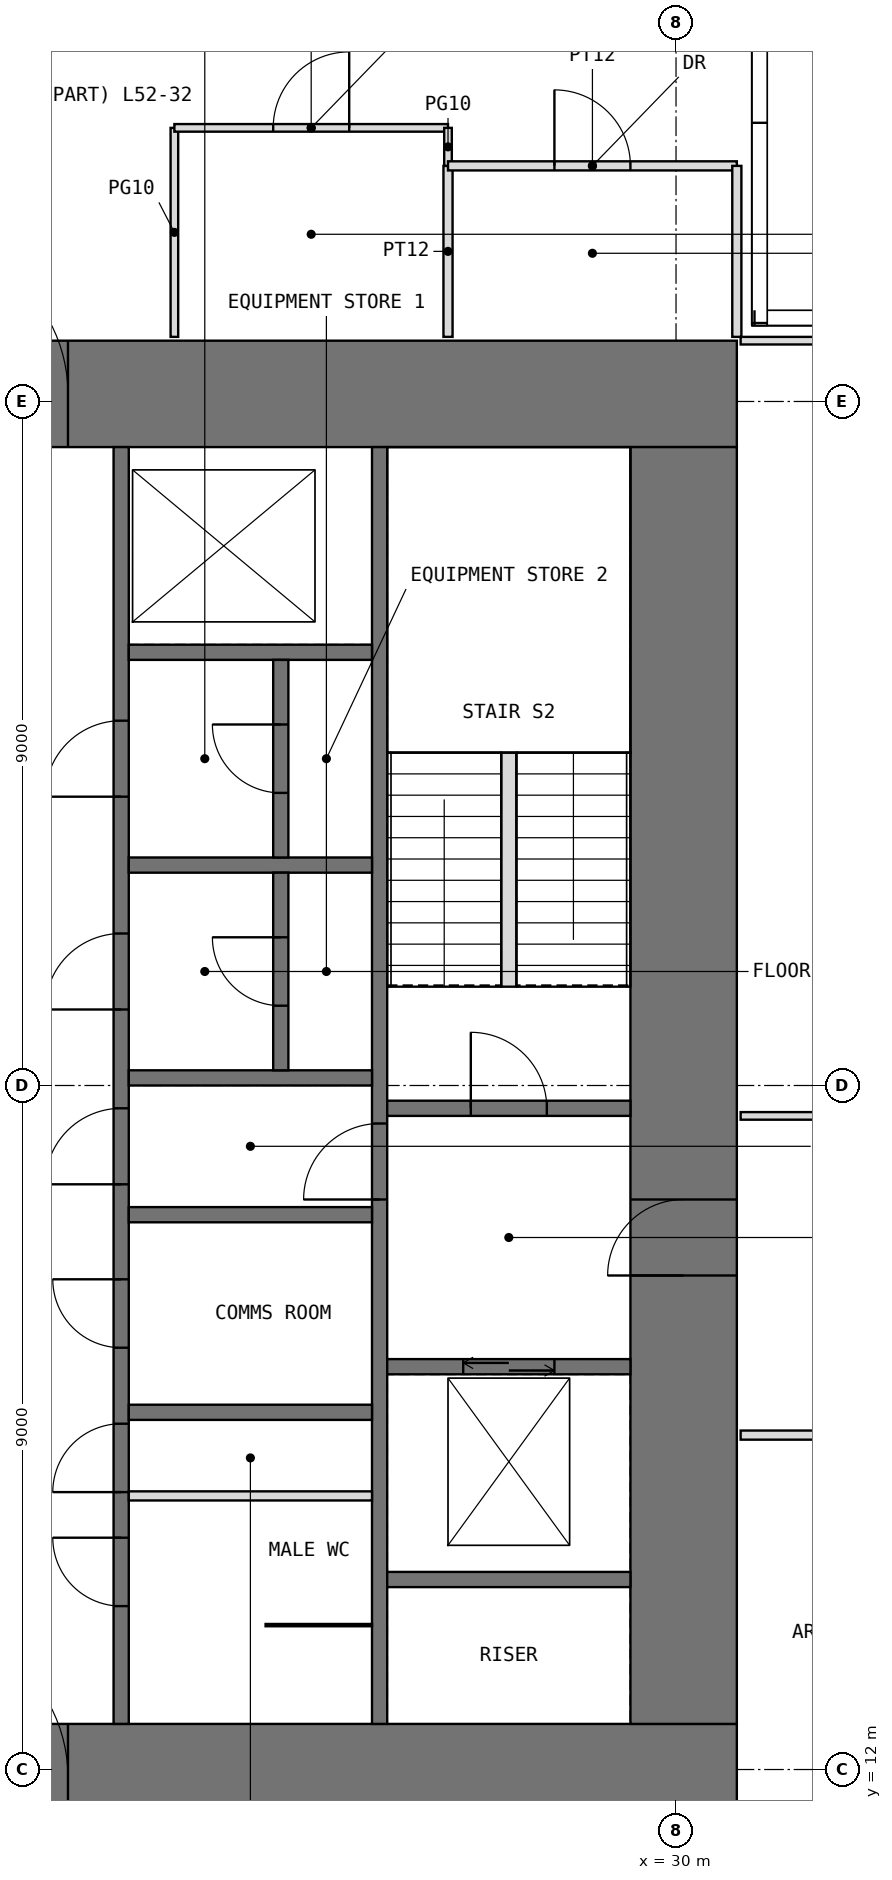
"""IFC4 building model, lengths in metres.
Left out: names, types, materials, properties, quantities, classifications, styles, units other than length and angle.
Written with IfcOpenShell. Run it as: python <this file> out.ifc"""

import sys

from ifc_helpers import new_model, si_unit, direction, frame, frame_2d, origin, place, context, subcontext, project, spatial, rectangle, extrude, element, fill, save


model = new_model("IFC4")
c1 = context("Model", 3, precision=1e-05, world=origin(), true_north=direction((0.0, 1.0)))
c2 = subcontext(c1, "Body", "Model", "MODEL_VIEW")
j1 = project(units=[si_unit("LENGTHUNIT", "METRE"), si_unit("PLANEANGLEUNIT", "RADIAN")], contexts=[c1])
p1 = place(None, origin())
s1 = spatial("IfcSite", under=j1, at=p1, CompositionType="ELEMENT")
p2 = place(p1, origin())
s2 = spatial("IfcBuilding", under=s1, at=p2, CompositionType="ELEMENT")
p3 = place(p2, frame((0.0, 0.0, 218.5)))
s3 = spatial("IfcBuildingStorey", under=s2, at=p3, CompositionType="ELEMENT", Elevation=218.5)
p4 = place(p3, frame((11.2, 11.9, -0.05), z_axis=(0.0, 0.0, 1.0), x_axis=(1.0, 0.0, 0.0)))
e1 = element("IfcWall", 1, at=p4, inside=s3, PredefinedType="SHEAR", context=c2, shape_type="SweptSolid", body=[
    extrude(rectangle(XDim=19.6, YDim=1.4, at=frame_2d((9.8, 0.0))), origin(), (0.0, 0.0, 1.0), 4.0),
])
p5 = place(p4, frame((8.8, 0.0, 0.05)))
e2 = element("IfcOpeningElement", 2, at=p5, cuts=e1, PredefinedType="OPENING", context=c2, shape_type="SweptSolid", body=[
    extrude(rectangle(XDim=2.0, YDim=2.2, at=frame_2d((1.0, 1.1))), frame((0.0, 0.71, 0.0), z_axis=(0.0, -1.0, 0.0), x_axis=(1.0, 0.0, 0.0)), (0.0, 0.0, 1.0), 1.42),
])
p6 = place(p3, frame((11.2, 30.1, -0.05), z_axis=(0.0, 0.0, 1.0), x_axis=(1.0, 0.0, 0.0)))
e3 = element("IfcWall", 3, at=p6, inside=s3, PredefinedType="SHEAR", context=c2, shape_type="SweptSolid", body=[
    extrude(rectangle(XDim=19.6, YDim=1.4, at=frame_2d((9.8, 0.0))), origin(), (0.0, 0.0, 1.0), 4.0),
])
p7 = place(p6, frame((8.8, 0.0, 0.05)))
e4 = element("IfcOpeningElement", 4, at=p7, cuts=e3, PredefinedType="OPENING", context=c2, shape_type="SweptSolid", body=[
    extrude(rectangle(XDim=2.0, YDim=2.2, at=frame_2d((1.0, 1.1))), frame((0.0, 0.71, 0.0), z_axis=(0.0, -1.0, 0.0), x_axis=(1.0, 0.0, 0.0)), (0.0, 0.0, 1.0), 1.42),
])
p8 = place(p3, frame((30.1, 12.6, -0.05), z_axis=(0.0, 0.0, 1.0), x_axis=(0.0, 1.0, 0.0)))
e5 = element("IfcWall", 5, at=p8, inside=s3, PredefinedType="SHEAR", context=c2, shape_type="SweptSolid", body=[
    extrude(rectangle(XDim=16.8, YDim=1.4, at=frame_2d((8.4, 0.0))), origin(), (0.0, 0.0, 1.0), 4.0),
])
p9 = place(p8, frame((5.9, 0.0, 0.05)))
e6 = element("IfcOpeningElement", 6, at=p9, cuts=e5, PredefinedType="OPENING", context=c2, shape_type="SweptSolid", body=[
    extrude(rectangle(XDim=1.0, YDim=2.2, at=frame_2d((0.5, 1.1))), frame((0.0, 0.71, 0.0), z_axis=(0.0, -1.0, 0.0), x_axis=(1.0, 0.0, 0.0)), (0.0, 0.0, 1.0), 1.42),
])
p10 = place(p3, frame((22.7, 12.6, -0.05), z_axis=(0.0, 0.0, 1.0), x_axis=(0.0, 1.0, 0.0)))
e7 = element("IfcWall", 7, at=p10, inside=s3, PredefinedType="SHEAR", context=c2, shape_type="SweptSolid", body=[
    extrude(rectangle(XDim=16.8, YDim=0.2, at=frame_2d((8.4, 0.0))), origin(), (0.0, 0.0, 1.0), 4.0),
])
p11 = place(p10, frame((3.05, 0.0, 0.05)))
e8 = element("IfcOpeningElement", 8, at=p11, cuts=e7, PredefinedType="OPENING", context=c2, shape_type="SweptSolid", body=[
    extrude(rectangle(XDim=0.9, YDim=2.2, at=frame_2d((0.45, 1.1))), frame((0.0, 0.11, 0.0), z_axis=(0.0, -1.0, 0.0), x_axis=(1.0, 0.0, 0.0)), (0.0, 0.0, 1.0), 0.22),
])
p12 = place(p10, frame((7.1, 0.0, 0.05)))
e9 = element("IfcOpeningElement", 9, at=p12, cuts=e7, PredefinedType="OPENING", context=c2, shape_type="SweptSolid", body=[
    extrude(rectangle(XDim=1.0, YDim=2.2, at=frame_2d((0.5, 1.1))), frame((0.0, 0.11, 0.0), z_axis=(0.0, -1.0, 0.0), x_axis=(1.0, 0.0, 0.0)), (0.0, 0.0, 1.0), 0.22),
])
p13 = place(p10, frame((1.55, 0.0, 0.05)))
e10 = element("IfcOpeningElement", 10, at=p13, cuts=e7, PredefinedType="OPENING", context=c2, shape_type="SweptSolid", body=[
    extrude(rectangle(XDim=0.9, YDim=2.2, at=frame_2d((0.45, 1.1))), frame((0.0, 0.11, 0.0), z_axis=(0.0, -1.0, 0.0), x_axis=(1.0, 0.0, 0.0)), (0.0, 0.0, 1.0), 0.22),
])
p14 = place(p10, frame((4.95, 0.0, 0.05)))
e11 = element("IfcOpeningElement", 11, at=p14, cuts=e7, PredefinedType="OPENING", context=c2, shape_type="SweptSolid", body=[
    extrude(rectangle(XDim=0.9, YDim=2.2, at=frame_2d((0.45, 1.1))), frame((0.0, 0.11, 0.0), z_axis=(0.0, -1.0, 0.0), x_axis=(1.0, 0.0, 0.0)), (0.0, 0.0, 1.0), 0.22),
])
p15 = place(p10, frame((9.4, 0.0, 0.05)))
e12 = element("IfcOpeningElement", 12, at=p15, cuts=e7, PredefinedType="OPENING", context=c2, shape_type="SweptSolid", body=[
    extrude(rectangle(XDim=1.0, YDim=2.2, at=frame_2d((0.5, 1.1))), frame((0.0, 0.11, 0.0), z_axis=(0.0, -1.0, 0.0), x_axis=(1.0, 0.0, 0.0)), (0.0, 0.0, 1.0), 0.22),
])
p16 = place(p10, frame((12.2, 0.0, 0.05)))
e13 = element("IfcOpeningElement", 13, at=p16, cuts=e7, PredefinedType="OPENING", context=c2, shape_type="SweptSolid", body=[
    extrude(rectangle(XDim=1.0, YDim=2.2, at=frame_2d((0.5, 1.1))), frame((0.0, 0.11, 0.0), z_axis=(0.0, -1.0, 0.0), x_axis=(1.0, 0.0, 0.0)), (0.0, 0.0, 1.0), 0.22),
])
p17 = place(p3, frame((26.1, 12.6, -0.05), z_axis=(0.0, 0.0, 1.0), x_axis=(0.0, 1.0, 0.0)))
e14 = element("IfcWall", 14, at=p17, inside=s3, PredefinedType="SHEAR", context=c2, shape_type="SweptSolid", body=[
    extrude(rectangle(XDim=16.8, YDim=0.2, at=frame_2d((8.4, 0.0))), origin(), (0.0, 0.0, 1.0), 4.0),
])
p18 = place(p17, frame((6.9, 0.0, 0.05)))
e15 = element("IfcOpeningElement", 15, at=p18, cuts=e14, PredefinedType="OPENING", context=c2, shape_type="SweptSolid", body=[
    extrude(rectangle(XDim=1.0, YDim=2.2, at=frame_2d((0.5, 1.1))), frame((0.0, 0.11, 0.0), z_axis=(0.0, -1.0, 0.0), x_axis=(1.0, 0.0, 0.0)), (0.0, 0.0, 1.0), 0.22),
])
for number, where, z_axis, x_axis in (
    (16, (22.8, 16.7, -0.05), (0.0, 0.0, 1.0), (1.0, 0.0, 0.0)),
    (17, (22.8, 19.3, -0.05), (0.0, 0.0, 1.0), (1.0, 0.0, 0.0)),
    (18, (22.8, 21.1, -0.05), (0.0, 0.0, 1.0), (1.0, 0.0, 0.0)),
    (19, (22.8, 23.9, -0.05), (0.0, 0.0, 1.0), (1.0, 0.0, 0.0)),
    (20, (22.8, 26.7, -0.05), (0.0, 0.0, 1.0), (1.0, 0.0, 0.0)),
    (21, (26.2, 14.5, -0.05), (0.0, 0.0, 1.0), (1.0, 0.0, 0.0)),
):
    element("IfcWall", number, at=place(p3, frame(where, z_axis=z_axis, x_axis=x_axis)), inside=s3, PredefinedType="SHEAR", context=c2, shape_type="SweptSolid", body=[
        extrude(rectangle(XDim=3.2, YDim=0.2, at=frame_2d((1.6, 0.0))), origin(), (0.0, 0.0, 1.0), 4.0),
    ])
p19 = place(p3, frame((26.2, 17.3, -0.05), z_axis=(0.0, 0.0, 1.0), x_axis=(1.0, 0.0, 0.0)))
e22 = element("IfcWall", 22, at=p19, inside=s3, PredefinedType="SHEAR", context=c2, shape_type="SweptSolid", body=[
    extrude(rectangle(XDim=3.2, YDim=0.2, at=frame_2d((1.6, 0.0))), origin(), (0.0, 0.0, 1.0), 4.0),
])
p20 = place(p19, frame((1.0, 0.0, 0.05)))
e23 = element("IfcOpeningElement", 23, at=p20, cuts=e22, PredefinedType="OPENING", context=c2, shape_type="SweptSolid", body=[
    extrude(rectangle(XDim=1.2, YDim=2.2, at=frame_2d((0.6, 1.1))), frame((0.0, 0.11, 0.0), z_axis=(0.0, -1.0, 0.0), x_axis=(1.0, 0.0, 0.0)), (0.0, 0.0, 1.0), 0.22),
])
p21 = place(p3, frame((26.2, 20.7, -0.05), z_axis=(0.0, 0.0, 1.0), x_axis=(1.0, 0.0, 0.0)))
e24 = element("IfcWall", 24, at=p21, inside=s3, PredefinedType="SHEAR", context=c2, shape_type="SweptSolid", body=[
    extrude(rectangle(XDim=3.2, YDim=0.2, at=frame_2d((1.6, 0.0))), origin(), (0.0, 0.0, 1.0), 4.0),
])
p22 = place(p21, frame((1.1, 0.0, 0.05)))
e25 = element("IfcOpeningElement", 25, at=p22, cuts=e24, PredefinedType="OPENING", context=c2, shape_type="SweptSolid", body=[
    extrude(rectangle(XDim=1.0, YDim=2.2, at=frame_2d((0.5, 1.1))), frame((0.0, 0.11, 0.0), z_axis=(0.0, -1.0, 0.0), x_axis=(1.0, 0.0, 0.0)), (0.0, 0.0, 1.0), 0.22),
])
p23 = place(p3, frame((22.8, 15.6, 0.0), z_axis=(0.0, 0.0, 1.0), x_axis=(1.0, 0.0, 0.0)))
e26 = element("IfcWall", 26, at=p23, inside=s3, PredefinedType="PARTITIONING", context=c2, shape_type="SweptSolid", body=[
    extrude(rectangle(XDim=3.2, YDim=0.12, at=frame_2d((1.6, 0.0))), origin(), (0.0, 0.0, 1.0), 3.75),
])
p24 = place(p3, frame((24.6, 13.9, 0.0), z_axis=(0.0, 0.0, 1.0), x_axis=(1.0, 0.0, 0.0)))
e27 = element("IfcWall", 27, at=p24, inside=s3, PredefinedType="PARTITIONING", context=c2, shape_type="SweptSolid", body=[
    extrude(rectangle(XDim=1.4, YDim=0.03, at=frame_2d((0.7, 0.0))), origin(), (0.0, 0.0, 1.0), 3.75),
])
p25 = place(p3, frame((24.8, 21.2, -0.05), z_axis=(0.0, 0.0, 1.0), x_axis=(0.0, 1.0, 0.0)))
e28 = element("IfcWall", 28, at=p25, inside=s3, PredefinedType="SHEAR", context=c2, shape_type="SweptSolid", body=[
    extrude(rectangle(XDim=2.6, YDim=0.2, at=frame_2d((1.3, 0.0))), origin(), (0.0, 0.0, 1.0), 4.0),
])
p26 = place(p25, frame((0.85, 0.0, 0.05)))
e29 = element("IfcOpeningElement", 29, at=p26, cuts=e28, PredefinedType="OPENING", context=c2, shape_type="SweptSolid", body=[
    extrude(rectangle(XDim=0.9, YDim=2.2, at=frame_2d((0.45, 1.1))), frame((0.0, 0.11, 0.0), z_axis=(0.0, -1.0, 0.0), x_axis=(1.0, 0.0, 0.0)), (0.0, 0.0, 1.0), 0.22),
])
p27 = place(p3, frame((24.8, 24.0, -0.05), z_axis=(0.0, 0.0, 1.0), x_axis=(0.0, 1.0, 0.0)))
e30 = element("IfcWall", 30, at=p27, inside=s3, PredefinedType="SHEAR", context=c2, shape_type="SweptSolid", body=[
    extrude(rectangle(XDim=2.6, YDim=0.2, at=frame_2d((1.3, 0.0))), origin(), (0.0, 0.0, 1.0), 4.0),
])
p28 = place(p27, frame((0.85, 0.0, 0.05)))
e31 = element("IfcOpeningElement", 31, at=p28, cuts=e30, PredefinedType="OPENING", context=c2, shape_type="SweptSolid", body=[
    extrude(rectangle(XDim=0.9, YDim=2.2, at=frame_2d((0.45, 1.1))), frame((0.0, 0.11, 0.0), z_axis=(0.0, -1.0, 0.0), x_axis=(1.0, 0.0, 0.0)), (0.0, 0.0, 1.0), 0.22),
])
p29 = place(p3, frame((23.4, 30.85, 0.0), z_axis=(0.0, 0.0, 1.0), x_axis=(0.0, 1.0, 0.0)))
e32 = element("IfcWall", 32, at=p29, inside=s3, PredefinedType="PARTITIONING", context=c2, shape_type="SweptSolid", body=[
    extrude(rectangle(XDim=2.75, YDim=0.1, at=frame_2d((1.375, 0.0))), origin(), (0.0, 0.0, 1.0), 3.75),
])
p30 = place(p3, frame((23.4, 33.6, 0.0), z_axis=(0.0, 0.0, 1.0), x_axis=(1.0, 0.0, 0.0)))
e33 = element("IfcWall", 33, at=p30, inside=s3, PredefinedType="PARTITIONING", context=c2, shape_type="SweptSolid", body=[
    extrude(rectangle(XDim=3.6, YDim=0.1, at=frame_2d((1.8, 0.0))), origin(), (0.0, 0.0, 1.0), 3.75),
])
p31 = place(p30, frame((1.3, 0.0, 0.0)))
e34 = element("IfcOpeningElement", 34, at=p31, cuts=e33, PredefinedType="OPENING", context=c2, shape_type="SweptSolid", body=[
    extrude(rectangle(XDim=1.0, YDim=2.4, at=frame_2d((0.5, 1.2))), frame((0.0, 0.06, 0.0), z_axis=(0.0, -1.0, 0.0), x_axis=(1.0, 0.0, 0.0)), (0.0, 0.0, 1.0), 0.12),
])
p32 = place(p3, frame((27.0, 30.85, 0.0), z_axis=(0.0, 0.0, 1.0), x_axis=(0.0, 1.0, 0.0)))
e35 = element("IfcWall", 35, at=p32, inside=s3, PredefinedType="PARTITIONING", context=c2, shape_type="SweptSolid", body=[
    extrude(rectangle(XDim=2.25, YDim=0.12, at=frame_2d((1.125, 0.0))), origin(), (0.0, 0.0, 1.0), 3.75),
])
p33 = place(p3, frame((27.0, 33.1, 0.0), z_axis=(0.0, 0.0, 1.0), x_axis=(0.0, 1.0, 0.0)))
e36 = element("IfcWall", 36, at=p33, inside=s3, PredefinedType="PARTITIONING", context=c2, shape_type="SweptSolid", body=[
    extrude(rectangle(XDim=0.5, YDim=0.1, at=frame_2d((0.25, 0.0))), origin(), (0.0, 0.0, 1.0), 3.75),
])
p34 = place(p3, frame((27.0, 33.1, 0.0), z_axis=(0.0, 0.0, 1.0), x_axis=(1.0, 0.0, 0.0)))
e37 = element("IfcWall", 37, at=p34, inside=s3, PredefinedType="PARTITIONING", context=c2, shape_type="SweptSolid", body=[
    extrude(rectangle(XDim=3.8, YDim=0.12, at=frame_2d((1.9, 0.0))), origin(), (0.0, 0.0, 1.0), 3.75),
])
p35 = place(p34, frame((1.4, 0.0, 0.0)))
e38 = element("IfcOpeningElement", 38, at=p35, cuts=e37, PredefinedType="OPENING", context=c2, shape_type="SweptSolid", body=[
    extrude(rectangle(XDim=1.0, YDim=2.2, at=frame_2d((0.5, 1.1))), frame((0.0, 0.07, 0.0), z_axis=(0.0, -1.0, 0.0), x_axis=(1.0, 0.0, 0.0)), (0.0, 0.0, 1.0), 0.14),
])
p36 = place(p3, frame((30.8, 30.85, 0.0), z_axis=(0.0, 0.0, 1.0), x_axis=(0.0, 1.0, 0.0)))
e39 = element("IfcWall", 39, at=p36, inside=s3, PredefinedType="PARTITIONING", context=c2, shape_type="SweptSolid", body=[
    extrude(rectangle(XDim=2.25, YDim=0.12, at=frame_2d((1.125, 0.0))), origin(), (0.0, 0.0, 1.0), 3.75),
])
p37 = place(p3, frame((30.85, 16.4, 0.0), z_axis=(0.0, 0.0, 1.0), x_axis=(1.0, 0.0, 0.0)))
e40 = element("IfcWall", 40, at=p37, inside=s3, PredefinedType="PARTITIONING", context=c2, shape_type="SweptSolid", body=[
    extrude(rectangle(XDim=4.45, YDim=0.12, at=frame_2d((2.225, 0.0))), origin(), (0.0, 0.0, 1.0), 3.75),
])
for number, where, z_axis, x_axis in (
    (41, (30.85, 20.6, 0.0), (0.0, 0.0, 1.0), (1.0, 0.0, 0.0)),
    (42, (30.85, 30.8, 0.0), (0.0, 0.0, 1.0), (1.0, 0.0, 0.0)),
):
    element("IfcWall", number, at=place(p3, frame(where, z_axis=z_axis, x_axis=x_axis)), inside=s3, PredefinedType="PARTITIONING", context=c2, shape_type="SweptSolid", body=[
        extrude(rectangle(XDim=4.95, YDim=0.1, at=frame_2d((2.475, 0.0))), origin(), (0.0, 0.0, 1.0), 3.75),
    ])
p38 = place(p3, frame((27.8, 22.3, 0.0), z_axis=(0.0, 0.0, 1.0), x_axis=(0.0, 1.0, 0.0)))
e43 = element("IfcWall", 43, at=p38, inside=s3, PredefinedType="PARTITIONING", context=c2, shape_type="SweptSolid", body=[
    extrude(rectangle(XDim=3.08, YDim=0.2, at=frame_2d((1.54, 0.0))), origin(), (0.0, 0.0, 1.0), 4.0),
])
p39 = place(p5, origin())
e44 = element("IfcDoor", 44, at=p39, inside=s3, OperationType="DOUBLE_DOOR_SINGLE_SWING", PredefinedType="DOOR", context=c2, shape_type="SweptSolid", body=[
    extrude(rectangle(XDim=2.0, YDim=2.2, at=frame_2d((1.0, 1.1))), frame((0.0, 0.025, 0.0), z_axis=(0.0, -1.0, 0.0), x_axis=(1.0, 0.0, 0.0)), (0.0, 0.0, 1.0), 0.05),
])
fill(e2, e44)
p40 = place(p7, origin())
e45 = element("IfcDoor", 45, at=p40, inside=s3, OperationType="DOUBLE_DOOR_SINGLE_SWING", PredefinedType="DOOR", context=c2, shape_type="SweptSolid", body=[
    extrude(rectangle(XDim=2.0, YDim=2.2, at=frame_2d((1.0, 1.1))), frame((0.0, 0.025, 0.0), z_axis=(0.0, -1.0, 0.0), x_axis=(1.0, 0.0, 0.0)), (0.0, 0.0, 1.0), 0.05),
])
fill(e4, e45)
p41 = place(p11, origin())
e46 = element("IfcDoor", 46, at=p41, inside=s3, OperationType="SINGLE_SWING_LEFT", PredefinedType="DOOR", context=c2, shape_type="SweptSolid", body=[
    extrude(rectangle(XDim=0.9, YDim=2.2, at=frame_2d((0.45, 1.1))), frame((0.0, 0.025, 0.0), z_axis=(0.0, -1.0, 0.0), x_axis=(1.0, 0.0, 0.0)), (0.0, 0.0, 1.0), 0.05),
])
fill(e8, e46)
p42 = place(p9, origin())
e47 = element("IfcDoor", 47, at=p42, inside=s3, OperationType="SINGLE_SWING_LEFT", PredefinedType="DOOR", context=c2, shape_type="SweptSolid", body=[
    extrude(rectangle(XDim=1.0, YDim=2.2, at=frame_2d((0.5, 1.1))), frame((0.0, 0.025, 0.0), z_axis=(0.0, -1.0, 0.0), x_axis=(1.0, 0.0, 0.0)), (0.0, 0.0, 1.0), 0.05),
])
fill(e6, e47)
p43 = place(p22, origin())
e48 = element("IfcDoor", 48, at=p43, inside=s3, OperationType="SINGLE_SWING_LEFT", PredefinedType="DOOR", context=c2, shape_type="SweptSolid", body=[
    extrude(rectangle(XDim=1.0, YDim=2.2, at=frame_2d((0.5, 1.1))), frame((0.0, 0.025, 0.0), z_axis=(0.0, -1.0, 0.0), x_axis=(1.0, 0.0, 0.0)), (0.0, 0.0, 1.0), 0.05),
])
fill(e25, e48)
p44 = place(p18, origin())
e49 = element("IfcDoor", 49, at=p44, inside=s3, OperationType="SINGLE_SWING_LEFT", PredefinedType="DOOR", context=c2, shape_type="SweptSolid", body=[
    extrude(rectangle(XDim=1.0, YDim=2.2, at=frame_2d((0.5, 1.1))), frame((0.0, 0.025, 0.0), z_axis=(0.0, -1.0, 0.0), x_axis=(1.0, 0.0, 0.0)), (0.0, 0.0, 1.0), 0.05),
])
fill(e15, e49)
p45 = place(p12, origin())
e50 = element("IfcDoor", 50, at=p45, inside=s3, OperationType="SINGLE_SWING_LEFT", PredefinedType="DOOR", context=c2, shape_type="SweptSolid", body=[
    extrude(rectangle(XDim=1.0, YDim=2.2, at=frame_2d((0.5, 1.1))), frame((0.0, 0.025, 0.0), z_axis=(0.0, -1.0, 0.0), x_axis=(1.0, 0.0, 0.0)), (0.0, 0.0, 1.0), 0.05),
])
fill(e9, e50)
p46 = place(p13, origin())
e51 = element("IfcDoor", 51, at=p46, inside=s3, OperationType="SINGLE_SWING_RIGHT", PredefinedType="DOOR", context=c2, shape_type="SweptSolid", body=[
    extrude(rectangle(XDim=0.9, YDim=2.2, at=frame_2d((0.45, 1.1))), frame((0.0, 0.025, 0.0), z_axis=(0.0, -1.0, 0.0), x_axis=(1.0, 0.0, 0.0)), (0.0, 0.0, 1.0), 0.05),
])
fill(e10, e51)
p47 = place(p14, origin())
e52 = element("IfcDoor", 52, at=p47, inside=s3, OperationType="SINGLE_SWING_RIGHT", PredefinedType="DOOR", context=c2, shape_type="SweptSolid", body=[
    extrude(rectangle(XDim=0.9, YDim=2.2, at=frame_2d((0.45, 1.1))), frame((0.0, 0.025, 0.0), z_axis=(0.0, -1.0, 0.0), x_axis=(1.0, 0.0, 0.0)), (0.0, 0.0, 1.0), 0.05),
])
fill(e11, e52)
p48 = place(p15, origin())
e53 = element("IfcDoor", 53, at=p48, inside=s3, OperationType="SINGLE_SWING_LEFT", PredefinedType="DOOR", context=c2, shape_type="SweptSolid", body=[
    extrude(rectangle(XDim=1.0, YDim=2.2, at=frame_2d((0.5, 1.1))), frame((0.0, 0.025, 0.0), z_axis=(0.0, -1.0, 0.0), x_axis=(1.0, 0.0, 0.0)), (0.0, 0.0, 1.0), 0.05),
])
fill(e12, e53)
p49 = place(p26, origin())
e54 = element("IfcDoor", 54, at=p49, inside=s3, OperationType="SINGLE_SWING_RIGHT", PredefinedType="DOOR", context=c2, shape_type="SweptSolid", body=[
    extrude(rectangle(XDim=0.9, YDim=2.2, at=frame_2d((0.45, 1.1))), frame((0.0, 0.025, 0.0), z_axis=(0.0, -1.0, 0.0), x_axis=(1.0, 0.0, 0.0)), (0.0, 0.0, 1.0), 0.05),
])
fill(e29, e54)
p50 = place(p16, origin())
e55 = element("IfcDoor", 55, at=p50, inside=s3, OperationType="SINGLE_SWING_LEFT", PredefinedType="DOOR", context=c2, shape_type="SweptSolid", body=[
    extrude(rectangle(XDim=1.0, YDim=2.2, at=frame_2d((0.5, 1.1))), frame((0.0, 0.025, 0.0), z_axis=(0.0, -1.0, 0.0), x_axis=(1.0, 0.0, 0.0)), (0.0, 0.0, 1.0), 0.05),
])
fill(e13, e55)
p51 = place(p28, origin())
e56 = element("IfcDoor", 56, at=p51, inside=s3, OperationType="SINGLE_SWING_RIGHT", PredefinedType="DOOR", context=c2, shape_type="SweptSolid", body=[
    extrude(rectangle(XDim=0.9, YDim=2.2, at=frame_2d((0.45, 1.1))), frame((0.0, 0.025, 0.0), z_axis=(0.0, -1.0, 0.0), x_axis=(1.0, 0.0, 0.0)), (0.0, 0.0, 1.0), 0.05),
])
fill(e31, e56)
p52 = place(p31, origin())
e57 = element("IfcDoor", 57, at=p52, inside=s3, OperationType="SINGLE_SWING_RIGHT", PredefinedType="DOOR", context=c2, shape_type="SweptSolid", body=[
    extrude(rectangle(XDim=1.0, YDim=2.4, at=frame_2d((0.5, 1.2))), frame((0.0, 0.025, 0.0), z_axis=(0.0, -1.0, 0.0), x_axis=(1.0, 0.0, 0.0)), (0.0, 0.0, 1.0), 0.05),
])
fill(e34, e57)
p53 = place(p35, origin())
e58 = element("IfcDoor", 58, at=p53, inside=s3, OperationType="SINGLE_SWING_LEFT", PredefinedType="DOOR", context=c2, shape_type="SweptSolid", body=[
    extrude(rectangle(XDim=1.0, YDim=2.2, at=frame_2d((0.5, 1.1))), frame((0.0, 0.025, 0.0), z_axis=(0.0, -1.0, 0.0), x_axis=(1.0, 0.0, 0.0)), (0.0, 0.0, 1.0), 0.05),
])
fill(e38, e58)
p54 = place(p20, origin())
e59 = element("IfcDoor", 59, at=p54, inside=s3, OperationType="DOUBLE_DOOR_SLIDING", PredefinedType="DOOR", context=c2, shape_type="SweptSolid", body=[
    extrude(rectangle(XDim=1.2, YDim=2.2, at=frame_2d((0.6, 1.1))), frame((0.0, 0.025, 0.0), z_axis=(0.0, -1.0, 0.0), x_axis=(1.0, 0.0, 0.0)), (0.0, 0.0, 1.0), 0.05),
])
fill(e23, e59)
save(model, sys.argv[1])
